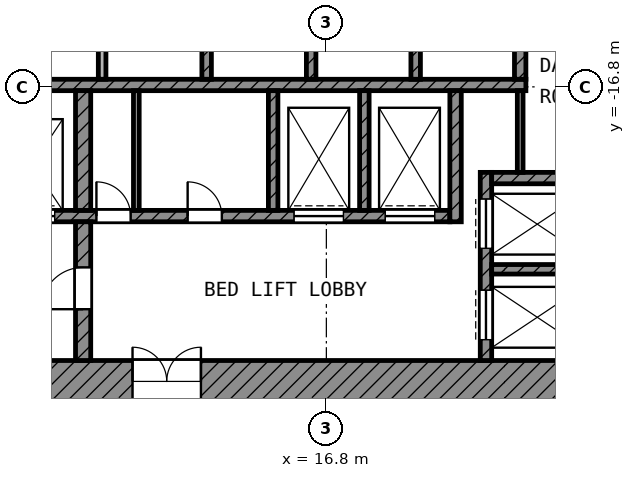
"""IFC4 building model, lengths in metres.
Left out: names, types, materials, properties, quantities, classifications, styles, units other than length and angle.
Written with IfcOpenShell. Run it as: python <this file> out.ifc"""

import sys

from ifc_helpers import new_model, si_unit, direction, frame, frame_2d, origin, place, context, subcontext, project, spatial, rectangle, extrude, element, fill, save


model = new_model("IFC4")
c1 = context("Model", 3, precision=1e-05, world=origin(), true_north=direction((0.0, 1.0)))
c2 = subcontext(c1, "Body", "Model", "MODEL_VIEW")
j1 = project(units=[si_unit("LENGTHUNIT", "METRE"), si_unit("PLANEANGLEUNIT", "RADIAN")], contexts=[c1])
p1 = place(None, origin())
s1 = spatial("IfcSite", under=j1, at=p1, CompositionType="ELEMENT")
p2 = place(p1, origin())
s2 = spatial("IfcBuilding", under=s1, at=p2, CompositionType="ELEMENT")
p3 = place(p2, frame((0.0, 0.0, 64.4)))
s3 = spatial("IfcBuildingStorey", under=s2, at=p3, CompositionType="ELEMENT", Elevation=64.4)
p4 = place(p3, frame((5.4, -24.55, 0.0), z_axis=(0.0, 0.0, 1.0), x_axis=(1.0, 0.0, 0.0)))
e1 = element("IfcWall", 1, at=p4, inside=s3, PredefinedType="SHEAR", context=c2, shape_type="SweptSolid", body=[
    extrude(rectangle(XDim=18.6, YDim=1.1, at=frame_2d((9.3, 0.0))), origin(), (0.0, 0.0, 1.0), 3.9),
])
p5 = place(p4, frame((6.3, 0.0, 0.0)))
e2 = element("IfcOpeningElement", 2, at=p5, cuts=e1, PredefinedType="OPENING", context=c2, shape_type="SweptSolid", body=[
    extrude(rectangle(XDim=1.8, YDim=2.1, at=frame_2d((0.9, 1.05))), frame((0.0, 0.56, 0.0), z_axis=(0.0, -1.0, 0.0), x_axis=(1.0, 0.0, 0.0)), (0.0, 0.0, 1.0), 1.12),
])
p6 = place(p3, frame((5.4, -16.75, 0.0), z_axis=(0.0, 0.0, 1.0), x_axis=(1.0, 0.0, 0.0)))
e3 = element("IfcWall", 3, at=p6, inside=s3, PredefinedType="SHEAR", context=c2, shape_type="SweptSolid", body=[
    extrude(rectangle(XDim=16.65, YDim=0.3, at=frame_2d((8.325, 0.0))), origin(), (0.0, 0.0, 1.0), 3.9),
])
p7 = place(p3, frame((5.4, -20.2, 0.0), z_axis=(0.0, 0.0, 1.0), x_axis=(1.0, 0.0, 0.0)))
e4 = element("IfcWall", 4, at=p7, inside=s3, PredefinedType="SHEAR", context=c2, shape_type="SweptSolid", body=[
    extrude(rectangle(XDim=14.65, YDim=0.3, at=frame_2d((7.325, 0.0))), origin(), (0.0, 0.0, 1.0), 3.9),
])
p8 = place(p7, frame((10.55, 0.0, 0.0)))
e5 = element("IfcOpeningElement", 5, at=p8, cuts=e4, PredefinedType="OPENING", context=c2, shape_type="SweptSolid", body=[
    extrude(rectangle(XDim=1.3, YDim=2.1, at=frame_2d((0.65, 1.05))), frame((0.0, 0.16, 0.0), z_axis=(0.0, -1.0, 0.0), x_axis=(1.0, 0.0, 0.0)), (0.0, 0.0, 1.0), 0.32),
])
p9 = place(p7, frame((12.95, 0.0, 0.0)))
e6 = element("IfcOpeningElement", 6, at=p9, cuts=e4, PredefinedType="OPENING", context=c2, shape_type="SweptSolid", body=[
    extrude(rectangle(XDim=1.3, YDim=2.1, at=frame_2d((0.65, 1.05))), frame((0.0, 0.16, 0.0), z_axis=(0.0, -1.0, 0.0), x_axis=(1.0, 0.0, 0.0)), (0.0, 0.0, 1.0), 0.32),
])
p10 = place(p7, frame((0.55, 0.0, 0.0)))
e7 = element("IfcOpeningElement", 7, at=p10, cuts=e4, PredefinedType="OPENING", context=c2, shape_type="SweptSolid", body=[
    extrude(rectangle(XDim=1.3, YDim=2.1, at=frame_2d((0.65, 1.05))), frame((0.0, 0.16, 0.0), z_axis=(0.0, -1.0, 0.0), x_axis=(1.0, 0.0, 0.0)), (0.0, 0.0, 1.0), 0.32),
])
p11 = place(p7, frame((2.95, 0.0, 0.0)))
e8 = element("IfcOpeningElement", 8, at=p11, cuts=e4, PredefinedType="OPENING", context=c2, shape_type="SweptSolid", body=[
    extrude(rectangle(XDim=1.3, YDim=2.1, at=frame_2d((0.65, 1.05))), frame((0.0, 0.16, 0.0), z_axis=(0.0, -1.0, 0.0), x_axis=(1.0, 0.0, 0.0)), (0.0, 0.0, 1.0), 0.32),
])
p12 = place(p7, frame((5.35, 0.0, 0.0)))
e9 = element("IfcOpeningElement", 9, at=p12, cuts=e4, PredefinedType="OPENING", context=c2, shape_type="SweptSolid", body=[
    extrude(rectangle(XDim=0.9, YDim=2.1, at=frame_2d((0.45, 1.05))), frame((0.0, 0.16, 0.0), z_axis=(0.0, -1.0, 0.0), x_axis=(1.0, 0.0, 0.0)), (0.0, 0.0, 1.0), 0.32),
])
p13 = place(p7, frame((7.75, 0.0, 0.0)))
e10 = element("IfcOpeningElement", 10, at=p13, cuts=e4, PredefinedType="OPENING", context=c2, shape_type="SweptSolid", body=[
    extrude(rectangle(XDim=0.9, YDim=2.1, at=frame_2d((0.45, 1.05))), frame((0.0, 0.16, 0.0), z_axis=(0.0, -1.0, 0.0), x_axis=(1.0, 0.0, 0.0)), (0.0, 0.0, 1.0), 0.32),
])
p14 = place(p3, frame((10.4, -24.0, 0.0), z_axis=(0.0, 0.0, 1.0), x_axis=(0.0, 1.0, 0.0)))
e11 = element("IfcWall", 11, at=p14, inside=s3, PredefinedType="SHEAR", context=c2, shape_type="SweptSolid", body=[
    extrude(rectangle(XDim=3.65, YDim=0.4, at=frame_2d((1.825, 0.0))), origin(), (0.0, 0.0, 1.0), 3.9),
])
p15 = place(p14, frame((1.35, 0.0, 0.0)))
e12 = element("IfcOpeningElement", 12, at=p15, cuts=e11, PredefinedType="OPENING", context=c2, shape_type="SweptSolid", body=[
    extrude(rectangle(XDim=1.1, YDim=2.1, at=frame_2d((0.55, 1.05))), frame((0.0, 0.21, 0.0), z_axis=(0.0, -1.0, 0.0), x_axis=(1.0, 0.0, 0.0)), (0.0, 0.0, 1.0), 0.42),
])
p16 = place(p3, frame((10.4, -20.05, 0.0), z_axis=(0.0, 0.0, 1.0), x_axis=(0.0, 1.0, 0.0)))
e13 = element("IfcWall", 13, at=p16, inside=s3, PredefinedType="SHEAR", context=c2, shape_type="SweptSolid", body=[
    extrude(rectangle(XDim=3.15, YDim=0.4, at=frame_2d((1.575, 0.0))), origin(), (0.0, 0.0, 1.0), 3.9),
])
p17 = place(p3, frame((20.2, -20.35, 0.0), z_axis=(0.0, 0.0, 1.0), x_axis=(0.0, 1.0, 0.0)))
e14 = element("IfcWall", 14, at=p17, inside=s3, PredefinedType="SHEAR", context=c2, shape_type="SweptSolid", body=[
    extrude(rectangle(XDim=3.45, YDim=0.3, at=frame_2d((1.725, 0.0))), origin(), (0.0, 0.0, 1.0), 3.9),
])
p18 = place(p3, frame((21.9, -16.6, 0.0), z_axis=(0.0, 0.0, 1.0), x_axis=(0.0, 1.0, 0.0)))
e15 = element("IfcWall", 15, at=p18, inside=s3, PredefinedType="SHEAR", context=c2, shape_type="SweptSolid", body=[
    extrude(rectangle(XDim=2.35, YDim=0.3, at=frame_2d((1.175, 0.0))), origin(), (0.0, 0.0, 1.0), 3.9),
])
p19 = place(p3, frame((21.15, -19.2, 0.0), z_axis=(0.0, 0.0, 1.0), x_axis=(1.0, 0.0, 0.0)))
e16 = element("IfcWall", 16, at=p19, inside=s3, PredefinedType="SHEAR", context=c2, shape_type="SweptSolid", body=[
    extrude(rectangle(XDim=2.85, YDim=0.3, at=frame_2d((1.425, 0.0))), origin(), (0.0, 0.0, 1.0), 3.9),
])
p20 = place(p3, frame((21.0, -24.0, 0.0), z_axis=(0.0, 0.0, 1.0), x_axis=(0.0, 1.0, 0.0)))
e17 = element("IfcWall", 17, at=p20, inside=s3, PredefinedType="SHEAR", context=c2, shape_type="SweptSolid", body=[
    extrude(rectangle(XDim=4.95, YDim=0.3, at=frame_2d((2.475, 0.0))), origin(), (0.0, 0.0, 1.0), 3.9),
])
p21 = place(p20, frame((2.95, 0.0, 0.0)))
e18 = element("IfcOpeningElement", 18, at=p21, cuts=e17, PredefinedType="OPENING", context=c2, shape_type="SweptSolid", body=[
    extrude(rectangle(XDim=1.3, YDim=2.1, at=frame_2d((0.65, 1.05))), frame((0.0, 0.16, 0.0), z_axis=(0.0, -1.0, 0.0), x_axis=(1.0, 0.0, 0.0)), (0.0, 0.0, 1.0), 0.32),
])
p22 = place(p20, frame((0.55, 0.0, 0.0)))
e19 = element("IfcOpeningElement", 19, at=p22, cuts=e17, PredefinedType="OPENING", context=c2, shape_type="SweptSolid", body=[
    extrude(rectangle(XDim=1.3, YDim=2.1, at=frame_2d((0.65, 1.05))), frame((0.0, 0.16, 0.0), z_axis=(0.0, -1.0, 0.0), x_axis=(1.0, 0.0, 0.0)), (0.0, 0.0, 1.0), 0.32),
])
p23 = place(p3, frame((21.15, -21.6, 0.0), z_axis=(0.0, 0.0, 1.0), x_axis=(1.0, 0.0, 0.0)))
e20 = element("IfcWall", 20, at=p23, inside=s3, PredefinedType="SHEAR", context=c2, shape_type="SweptSolid", body=[
    extrude(rectangle(XDim=2.85, YDim=0.25, at=frame_2d((1.425, 0.0))), origin(), (0.0, 0.0, 1.0), 3.9),
])
for number, where, z_axis, x_axis in (
    (21, (15.4, -20.05, 0.0), (0.0, 0.0, 1.0), (0.0, 1.0, 0.0)),
    (22, (17.8, -20.05, 0.0), (0.0, 0.0, 1.0), (0.0, 1.0, 0.0)),
):
    element("IfcWall", number, at=place(p3, frame(where, z_axis=z_axis, x_axis=x_axis)), inside=s3, PredefinedType="SHEAR", context=c2, shape_type="SweptSolid", body=[
        extrude(rectangle(XDim=3.15, YDim=0.25, at=frame_2d((1.575, 0.0))), origin(), (0.0, 0.0, 1.0), 3.9),
    ])
p24 = place(p3, frame((10.9, -16.6, 0.0), z_axis=(0.0, 0.0, 1.0), x_axis=(0.0, 1.0, 0.0)))
e23 = element("IfcWall", 23, at=p24, inside=s3, PredefinedType="PARTITIONING", context=c2, shape_type="SweptSolid", body=[
    extrude(rectangle(XDim=2.35, YDim=0.2, at=frame_2d((1.175, 0.0))), origin(), (0.0, 0.0, 1.0), 3.9),
])
for number, where, z_axis, x_axis in (
    (24, (13.65, -16.6, 0.0), (0.0, 0.0, 1.0), (0.0, 1.0, 0.0)),
    (25, (16.4, -16.6, 0.0), (0.0, 0.0, 1.0), (0.0, 1.0, 0.0)),
    (26, (19.15, -16.6, 0.0), (0.0, 0.0, 1.0), (0.0, 1.0, 0.0)),
):
    element("IfcWall", number, at=place(p3, frame(where, z_axis=z_axis, x_axis=x_axis)), inside=s3, PredefinedType="SHEAR", context=c2, shape_type="SweptSolid", body=[
        extrude(rectangle(XDim=2.35, YDim=0.25, at=frame_2d((1.175, 0.0))), origin(), (0.0, 0.0, 1.0), 3.9),
    ])
p25 = place(p3, frame((21.9, -19.05, 0.0), z_axis=(0.0, 0.0, 1.0), x_axis=(0.0, 1.0, 0.0)))
e27 = element("IfcWall", 27, at=p25, inside=s3, PredefinedType="PARTITIONING", context=c2, shape_type="SweptSolid", body=[
    extrude(rectangle(XDim=2.15, YDim=0.15, at=frame_2d((1.075, 0.0))), origin(), (0.0, 0.0, 1.0), 3.9),
])
p26 = place(p3, frame((11.8, -20.05, 0.0), z_axis=(0.0, 0.0, 1.0), x_axis=(0.0, 1.0, 0.0)))
e28 = element("IfcWall", 28, at=p26, inside=s3, PredefinedType="PARTITIONING", context=c2, shape_type="SweptSolid", body=[
    extrude(rectangle(XDim=3.15, YDim=0.15, at=frame_2d((1.575, 0.0))), origin(), (0.0, 0.0, 1.0), 3.9),
])
p27 = place(p21, origin())
e29 = element("IfcDoor", 29, at=p27, inside=s3, OperationType="DOUBLE_DOOR_SLIDING", PredefinedType="DOOR", context=c2, shape_type="SweptSolid", body=[
    extrude(rectangle(XDim=1.3, YDim=2.1, at=frame_2d((0.65, 1.05))), frame((0.0, 0.025, 0.0), z_axis=(0.0, -1.0, 0.0), x_axis=(1.0, 0.0, 0.0)), (0.0, 0.0, 1.0), 0.05),
])
fill(e18, e29)
p28 = place(p22, origin())
e30 = element("IfcDoor", 30, at=p28, inside=s3, OperationType="DOUBLE_DOOR_SLIDING", PredefinedType="DOOR", context=c2, shape_type="SweptSolid", body=[
    extrude(rectangle(XDim=1.3, YDim=2.1, at=frame_2d((0.65, 1.05))), frame((0.0, 0.025, 0.0), z_axis=(0.0, -1.0, 0.0), x_axis=(1.0, 0.0, 0.0)), (0.0, 0.0, 1.0), 0.05),
])
fill(e19, e30)
p29 = place(p8, origin())
e31 = element("IfcDoor", 31, at=p29, inside=s3, OperationType="DOUBLE_DOOR_SLIDING", PredefinedType="DOOR", context=c2, shape_type="SweptSolid", body=[
    extrude(rectangle(XDim=1.3, YDim=2.1, at=frame_2d((0.65, 1.05))), frame((0.0, 0.025, 0.0), z_axis=(0.0, -1.0, 0.0), x_axis=(1.0, 0.0, 0.0)), (0.0, 0.0, 1.0), 0.05),
])
fill(e5, e31)
p30 = place(p9, origin())
e32 = element("IfcDoor", 32, at=p30, inside=s3, OperationType="DOUBLE_DOOR_SLIDING", PredefinedType="DOOR", context=c2, shape_type="SweptSolid", body=[
    extrude(rectangle(XDim=1.3, YDim=2.1, at=frame_2d((0.65, 1.05))), frame((0.0, 0.025, 0.0), z_axis=(0.0, -1.0, 0.0), x_axis=(1.0, 0.0, 0.0)), (0.0, 0.0, 1.0), 0.05),
])
fill(e6, e32)
p31 = place(p11, origin())
e33 = element("IfcDoor", 33, at=p31, inside=s3, OperationType="DOUBLE_DOOR_SLIDING", PredefinedType="DOOR", context=c2, shape_type="SweptSolid", body=[
    extrude(rectangle(XDim=1.3, YDim=2.1, at=frame_2d((0.65, 1.05))), frame((0.0, 0.025, 0.0), z_axis=(0.0, -1.0, 0.0), x_axis=(1.0, 0.0, 0.0)), (0.0, 0.0, 1.0), 0.05),
])
fill(e8, e33)
p32 = place(p15, origin())
e34 = element("IfcDoor", 34, at=p32, inside=s3, OperationType="SINGLE_SWING_LEFT", PredefinedType="DOOR", context=c2, shape_type="SweptSolid", body=[
    extrude(rectangle(XDim=1.1, YDim=2.1, at=frame_2d((0.55, 1.05))), frame((0.0, 0.025, 0.0), z_axis=(0.0, -1.0, 0.0), x_axis=(1.0, 0.0, 0.0)), (0.0, 0.0, 1.0), 0.05),
])
fill(e12, e34)
p33 = place(p5, origin())
e35 = element("IfcDoor", 35, at=p33, inside=s3, OperationType="DOUBLE_DOOR_SINGLE_SWING", PredefinedType="DOOR", context=c2, shape_type="SweptSolid", body=[
    extrude(rectangle(XDim=1.8, YDim=2.1, at=frame_2d((0.9, 1.05))), frame((0.0, 0.025, 0.0), z_axis=(0.0, -1.0, 0.0), x_axis=(1.0, 0.0, 0.0)), (0.0, 0.0, 1.0), 0.05),
])
fill(e2, e35)
p34 = place(p12, origin())
e36 = element("IfcDoor", 36, at=p34, inside=s3, OperationType="SINGLE_SWING_LEFT", PredefinedType="DOOR", context=c2, shape_type="SweptSolid", body=[
    extrude(rectangle(XDim=0.9, YDim=2.1, at=frame_2d((0.45, 1.05))), frame((0.0, 0.025, 0.0), z_axis=(0.0, -1.0, 0.0), x_axis=(1.0, 0.0, 0.0)), (0.0, 0.0, 1.0), 0.05),
])
fill(e9, e36)
p35 = place(p13, origin())
e37 = element("IfcDoor", 37, at=p35, inside=s3, OperationType="SINGLE_SWING_LEFT", PredefinedType="DOOR", context=c2, shape_type="SweptSolid", body=[
    extrude(rectangle(XDim=0.9, YDim=2.1, at=frame_2d((0.45, 1.05))), frame((0.0, 0.025, 0.0), z_axis=(0.0, -1.0, 0.0), x_axis=(1.0, 0.0, 0.0)), (0.0, 0.0, 1.0), 0.05),
])
fill(e10, e37)
save(model, sys.argv[1])
